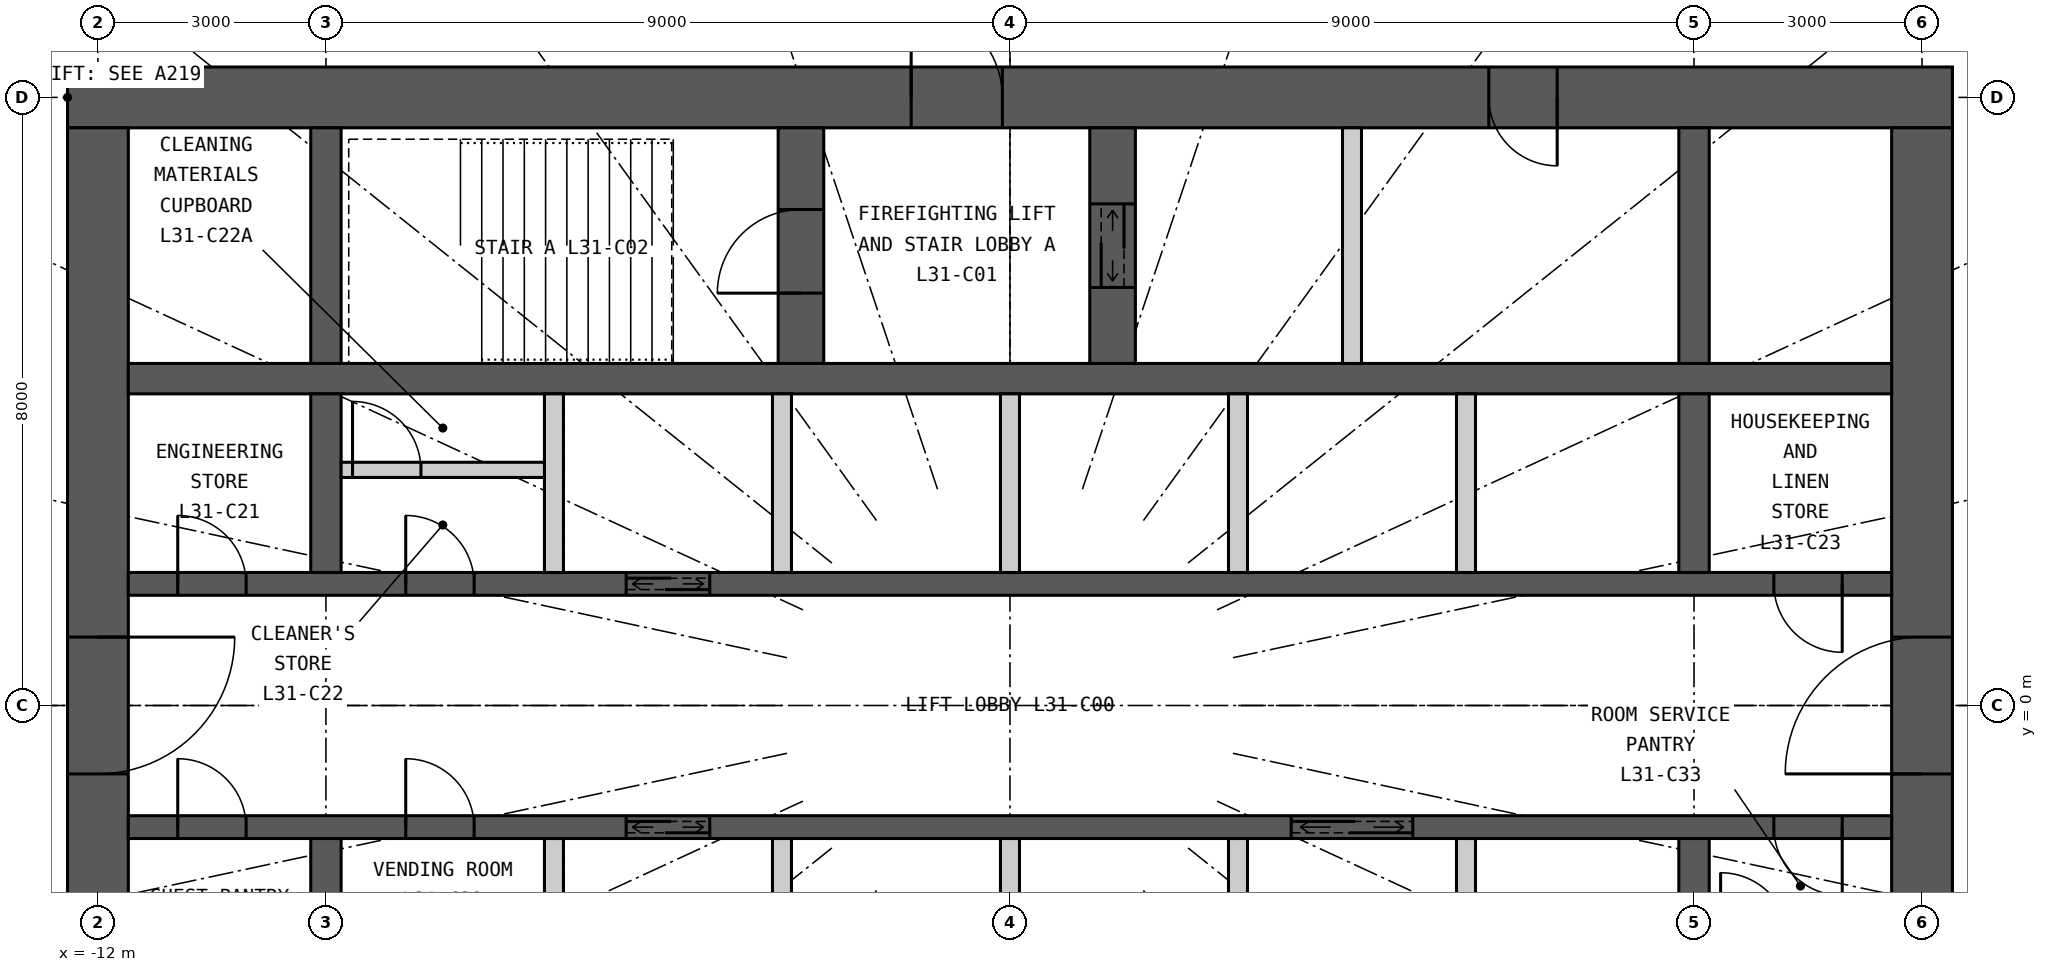
"""IFC4 building model, lengths in metres.
Left out: names, types, materials, properties, quantities, classifications, styles, units other than length and angle.
Written with IfcOpenShell. Run it as: python <this file> out.ifc"""

import sys

from ifc_helpers import new_model, si_unit, direction, frame, frame_2d, origin, place, context, subcontext, project, spatial, rectangle, extrude, element, fill, save


model = new_model("IFC4")
c1 = context("Model", 3, precision=1e-05, world=origin(), true_north=direction((0.0, 1.0)))
c2 = subcontext(c1, "Body", "Model", "MODEL_VIEW")
j1 = project(units=[si_unit("LENGTHUNIT", "METRE"), si_unit("PLANEANGLEUNIT", "RADIAN")], contexts=[c1])
p1 = place(None, origin())
s1 = spatial("IfcSite", under=j1, at=p1, CompositionType="ELEMENT")
p2 = place(p1, origin())
s2 = spatial("IfcBuilding", under=s1, at=p2, CompositionType="ELEMENT")
p3 = place(p2, frame((0.0, 0.0, 122.1)))
s3 = spatial("IfcBuildingStorey", under=s2, at=p3, CompositionType="ELEMENT", Elevation=122.1)
p4 = place(p3, frame((-12.4, 8.0, 0.0), z_axis=(0.0, 0.0, 1.0), x_axis=(1.0, 0.0, 0.0)))
e1 = element("IfcWall", 1, at=p4, inside=s3, PredefinedType="SHEAR", context=c2, shape_type="SweptSolid", body=[
    extrude(rectangle(XDim=24.8, YDim=0.8, at=frame_2d((12.4, 0.0))), origin(), (0.0, 0.0, 1.0), 3.3),
])
p5 = place(p4, frame((11.1, 0.0, 0.0)))
e2 = element("IfcOpeningElement", 2, at=p5, cuts=e1, PredefinedType="OPENING", context=c2, shape_type="SweptSolid", body=[
    extrude(rectangle(XDim=1.2, YDim=2.2, at=frame_2d((0.6, 1.1))), frame((0.0, 0.41, 0.0), z_axis=(0.0, -1.0, 0.0), x_axis=(1.0, 0.0, 0.0)), (0.0, 0.0, 1.0), 0.82),
])
p6 = place(p4, frame((18.7, 0.0, 0.0)))
e3 = element("IfcOpeningElement", 3, at=p6, cuts=e1, PredefinedType="OPENING", context=c2, shape_type="SweptSolid", body=[
    extrude(rectangle(XDim=0.9, YDim=2.2, at=frame_2d((0.45, 1.1))), frame((0.0, 0.41, 0.0), z_axis=(0.0, -1.0, 0.0), x_axis=(1.0, 0.0, 0.0)), (0.0, 0.0, 1.0), 0.82),
])
p7 = place(p3, frame((12.0, -7.6, 0.0), z_axis=(0.0, 0.0, 1.0), x_axis=(0.0, 1.0, 0.0)))
e4 = element("IfcWall", 4, at=p7, inside=s3, PredefinedType="SHEAR", context=c2, shape_type="SweptSolid", body=[
    extrude(rectangle(XDim=15.2, YDim=0.8, at=frame_2d((7.6, 0.0))), origin(), (0.0, 0.0, 1.0), 3.3),
])
p8 = place(p7, frame((6.7, 0.0, 0.0)))
e5 = element("IfcOpeningElement", 5, at=p8, cuts=e4, PredefinedType="OPENING", context=c2, shape_type="SweptSolid", body=[
    extrude(rectangle(XDim=1.8, YDim=2.2, at=frame_2d((0.9, 1.1))), frame((0.0, 0.41, 0.0), z_axis=(0.0, -1.0, 0.0), x_axis=(1.0, 0.0, 0.0)), (0.0, 0.0, 1.0), 0.82),
])
p9 = place(p3, frame((-12.0, 7.6, 0.0), z_axis=(0.0, 0.0, 1.0), x_axis=(0.0, -1.0, 0.0)))
e6 = element("IfcWall", 6, at=p9, inside=s3, PredefinedType="SHEAR", context=c2, shape_type="SweptSolid", body=[
    extrude(rectangle(XDim=15.2, YDim=0.8, at=frame_2d((7.6, 0.0))), origin(), (0.0, 0.0, 1.0), 3.3),
])
p10 = place(p9, frame((6.7, 0.0, 0.0)))
e7 = element("IfcOpeningElement", 7, at=p10, cuts=e6, PredefinedType="OPENING", context=c2, shape_type="SweptSolid", body=[
    extrude(rectangle(XDim=1.8, YDim=2.2, at=frame_2d((0.9, 1.1))), frame((0.0, 0.41, 0.0), z_axis=(0.0, -1.0, 0.0), x_axis=(1.0, 0.0, 0.0)), (0.0, 0.0, 1.0), 0.82),
])
p11 = place(p3, frame((-11.6, 4.3, 0.0), z_axis=(0.0, 0.0, 1.0), x_axis=(1.0, 0.0, 0.0)))
e8 = element("IfcWall", 8, at=p11, inside=s3, PredefinedType="SHEAR", context=c2, shape_type="SweptSolid", body=[
    extrude(rectangle(XDim=23.2, YDim=0.4, at=frame_2d((11.6, 0.0))), origin(), (0.0, 0.0, 1.0), 3.3),
])
p12 = place(p3, frame((-11.6, 1.6, 0.0), z_axis=(0.0, 0.0, 1.0), x_axis=(1.0, 0.0, 0.0)))
e9 = element("IfcWall", 9, at=p12, inside=s3, PredefinedType="SHEAR", context=c2, shape_type="SweptSolid", body=[
    extrude(rectangle(XDim=23.2, YDim=0.3, at=frame_2d((11.6, 0.0))), origin(), (0.0, 0.0, 1.0), 3.3),
])
p13 = place(p12, frame((6.55, 0.0, 0.0)))
e10 = element("IfcOpeningElement", 10, at=p13, cuts=e9, PredefinedType="OPENING", context=c2, shape_type="SweptSolid", body=[
    extrude(rectangle(XDim=1.1, YDim=2.2, at=frame_2d((0.55, 1.1))), frame((0.0, 0.16, 0.0), z_axis=(0.0, -1.0, 0.0), x_axis=(1.0, 0.0, 0.0)), (0.0, 0.0, 1.0), 0.32),
])
p14 = place(p12, frame((0.65, 0.0, 0.0)))
e11 = element("IfcOpeningElement", 11, at=p14, cuts=e9, PredefinedType="OPENING", context=c2, shape_type="SweptSolid", body=[
    extrude(rectangle(XDim=0.9, YDim=2.2, at=frame_2d((0.45, 1.1))), frame((0.0, 0.16, 0.0), z_axis=(0.0, -1.0, 0.0), x_axis=(1.0, 0.0, 0.0)), (0.0, 0.0, 1.0), 0.32),
])
p15 = place(p12, frame((3.65, 0.0, 0.0)))
e12 = element("IfcOpeningElement", 12, at=p15, cuts=e9, PredefinedType="OPENING", context=c2, shape_type="SweptSolid", body=[
    extrude(rectangle(XDim=0.9, YDim=2.2, at=frame_2d((0.45, 1.1))), frame((0.0, 0.16, 0.0), z_axis=(0.0, -1.0, 0.0), x_axis=(1.0, 0.0, 0.0)), (0.0, 0.0, 1.0), 0.32),
])
p16 = place(p12, frame((21.65, 0.0, 0.0)))
e13 = element("IfcOpeningElement", 13, at=p16, cuts=e9, PredefinedType="OPENING", context=c2, shape_type="SweptSolid", body=[
    extrude(rectangle(XDim=0.9, YDim=2.2, at=frame_2d((0.45, 1.1))), frame((0.0, 0.16, 0.0), z_axis=(0.0, -1.0, 0.0), x_axis=(1.0, 0.0, 0.0)), (0.0, 0.0, 1.0), 0.32),
])
p17 = place(p3, frame((-11.6, -1.6, 0.0), z_axis=(0.0, 0.0, 1.0), x_axis=(1.0, 0.0, 0.0)))
e14 = element("IfcWall", 14, at=p17, inside=s3, PredefinedType="SHEAR", context=c2, shape_type="SweptSolid", body=[
    extrude(rectangle(XDim=23.2, YDim=0.3, at=frame_2d((11.6, 0.0))), origin(), (0.0, 0.0, 1.0), 3.3),
])
p18 = place(p17, frame((6.55, 0.0, 0.0)))
e15 = element("IfcOpeningElement", 15, at=p18, cuts=e14, PredefinedType="OPENING", context=c2, shape_type="SweptSolid", body=[
    extrude(rectangle(XDim=1.1, YDim=2.2, at=frame_2d((0.55, 1.1))), frame((0.0, 0.16, 0.0), z_axis=(0.0, -1.0, 0.0), x_axis=(1.0, 0.0, 0.0)), (0.0, 0.0, 1.0), 0.32),
])
p19 = place(p17, frame((15.3, 0.0, 0.0)))
e16 = element("IfcOpeningElement", 16, at=p19, cuts=e14, PredefinedType="OPENING", context=c2, shape_type="SweptSolid", body=[
    extrude(rectangle(XDim=1.6, YDim=2.4, at=frame_2d((0.8, 1.2))), frame((0.0, 0.16, 0.0), z_axis=(0.0, -1.0, 0.0), x_axis=(1.0, 0.0, 0.0)), (0.0, 0.0, 1.0), 0.32),
])
p20 = place(p17, frame((0.65, 0.0, 0.0)))
e17 = element("IfcOpeningElement", 17, at=p20, cuts=e14, PredefinedType="OPENING", context=c2, shape_type="SweptSolid", body=[
    extrude(rectangle(XDim=0.9, YDim=2.2, at=frame_2d((0.45, 1.1))), frame((0.0, 0.16, 0.0), z_axis=(0.0, -1.0, 0.0), x_axis=(1.0, 0.0, 0.0)), (0.0, 0.0, 1.0), 0.32),
])
p21 = place(p17, frame((3.65, 0.0, 0.0)))
e18 = element("IfcOpeningElement", 18, at=p21, cuts=e14, PredefinedType="OPENING", context=c2, shape_type="SweptSolid", body=[
    extrude(rectangle(XDim=0.9, YDim=2.2, at=frame_2d((0.45, 1.1))), frame((0.0, 0.16, 0.0), z_axis=(0.0, -1.0, 0.0), x_axis=(1.0, 0.0, 0.0)), (0.0, 0.0, 1.0), 0.32),
])
p22 = place(p17, frame((21.65, 0.0, 0.0)))
e19 = element("IfcOpeningElement", 19, at=p22, cuts=e14, PredefinedType="OPENING", context=c2, shape_type="SweptSolid", body=[
    extrude(rectangle(XDim=0.9, YDim=2.2, at=frame_2d((0.45, 1.1))), frame((0.0, 0.16, 0.0), z_axis=(0.0, -1.0, 0.0), x_axis=(1.0, 0.0, 0.0)), (0.0, 0.0, 1.0), 0.32),
])
p23 = place(p3, frame((-9.0, 4.5, 0.0), z_axis=(0.0, 0.0, 1.0), x_axis=(0.0, 1.0, 0.0)))
e20 = element("IfcWall", 20, at=p23, inside=s3, PredefinedType="SHEAR", context=c2, shape_type="SweptSolid", body=[
    extrude(rectangle(XDim=3.1, YDim=0.4, at=frame_2d((1.55, 0.0))), origin(), (0.0, 0.0, 1.0), 3.3),
])
for number, where, z_axis, x_axis in (
    (21, (-9.0, 1.75, 0.0), (0.0, 0.0, 1.0), (0.0, 1.0, 0.0)),
    (22, (-9.0, -4.1, 0.0), (0.0, 0.0, 1.0), (0.0, 1.0, 0.0)),
):
    element("IfcWall", number, at=place(p3, frame(where, z_axis=z_axis, x_axis=x_axis)), inside=s3, PredefinedType="SHEAR", context=c2, shape_type="SweptSolid", body=[
        extrude(rectangle(XDim=2.35, YDim=0.4, at=frame_2d((1.175, 0.0))), origin(), (0.0, 0.0, 1.0), 3.3),
    ])
p24 = place(p3, frame((9.0, 4.5, 0.0), z_axis=(0.0, 0.0, 1.0), x_axis=(0.0, 1.0, 0.0)))
e23 = element("IfcWall", 23, at=p24, inside=s3, PredefinedType="SHEAR", context=c2, shape_type="SweptSolid", body=[
    extrude(rectangle(XDim=3.1, YDim=0.4, at=frame_2d((1.55, 0.0))), origin(), (0.0, 0.0, 1.0), 3.3),
])
for number, where, z_axis, x_axis in (
    (24, (9.0, 1.75, 0.0), (0.0, 0.0, 1.0), (0.0, 1.0, 0.0)),
    (25, (9.0, -4.1, 0.0), (0.0, 0.0, 1.0), (0.0, 1.0, 0.0)),
):
    element("IfcWall", number, at=place(p3, frame(where, z_axis=z_axis, x_axis=x_axis)), inside=s3, PredefinedType="SHEAR", context=c2, shape_type="SweptSolid", body=[
        extrude(rectangle(XDim=2.35, YDim=0.4, at=frame_2d((1.175, 0.0))), origin(), (0.0, 0.0, 1.0), 3.3),
    ])
p25 = place(p3, frame((-2.75, 4.5, 0.0), z_axis=(0.0, 0.0, 1.0), x_axis=(0.0, 1.0, 0.0)))
e26 = element("IfcWall", 26, at=p25, inside=s3, PredefinedType="SHEAR", context=c2, shape_type="SweptSolid", body=[
    extrude(rectangle(XDim=3.1, YDim=0.6, at=frame_2d((1.55, 0.0))), origin(), (0.0, 0.0, 1.0), 3.3),
])
p26 = place(p25, frame((0.925, 0.0, 0.0)))
e27 = element("IfcOpeningElement", 27, at=p26, cuts=e26, PredefinedType="OPENING", context=c2, shape_type="SweptSolid", body=[
    extrude(rectangle(XDim=1.1, YDim=2.2, at=frame_2d((0.55, 1.1))), frame((0.0, 0.31, 0.0), z_axis=(0.0, -1.0, 0.0), x_axis=(1.0, 0.0, 0.0)), (0.0, 0.0, 1.0), 0.62),
])
p27 = place(p3, frame((1.35, 4.5, 0.0), z_axis=(0.0, 0.0, 1.0), x_axis=(0.0, 1.0, 0.0)))
e28 = element("IfcWall", 28, at=p27, inside=s3, PredefinedType="SHEAR", context=c2, shape_type="SweptSolid", body=[
    extrude(rectangle(XDim=3.1, YDim=0.6, at=frame_2d((1.55, 0.0))), origin(), (0.0, 0.0, 1.0), 3.3),
])
p28 = place(p27, frame((1.0, 0.0, 0.0)))
e29 = element("IfcOpeningElement", 29, at=p28, cuts=e28, PredefinedType="OPENING", context=c2, shape_type="SweptSolid", body=[
    extrude(rectangle(XDim=1.1, YDim=2.2, at=frame_2d((0.55, 1.1))), frame((0.0, 0.31, 0.0), z_axis=(0.0, -1.0, 0.0), x_axis=(1.0, 0.0, 0.0)), (0.0, 0.0, 1.0), 0.62),
])
p29 = place(p3, frame((4.5, 4.5, 0.0), z_axis=(0.0, 0.0, 1.0), x_axis=(0.0, 1.0, 0.0)))
e30 = element("IfcWall", 30, at=p29, inside=s3, PredefinedType="PARTITIONING", context=c2, shape_type="SweptSolid", body=[
    extrude(rectangle(XDim=3.1, YDim=0.25, at=frame_2d((1.55, 0.0))), origin(), (0.0, 0.0, 1.0), 3.3),
])
for number, where, z_axis, x_axis in (
    (31, (-6.0, 1.75, 0.0), (0.0, 0.0, 1.0), (0.0, 1.0, 0.0)),
    (32, (-3.0, 1.75, 0.0), (0.0, 0.0, 1.0), (0.0, 1.0, 0.0)),
    (33, (0.0, 1.75, 0.0), (0.0, 0.0, 1.0), (0.0, 1.0, 0.0)),
    (34, (3.0, 1.75, 0.0), (0.0, 0.0, 1.0), (0.0, 1.0, 0.0)),
    (35, (6.0, 1.75, 0.0), (0.0, 0.0, 1.0), (0.0, 1.0, 0.0)),
    (36, (-6.0, -4.1, 0.0), (0.0, 0.0, 1.0), (0.0, 1.0, 0.0)),
    (37, (-3.0, -4.1, 0.0), (0.0, 0.0, 1.0), (0.0, 1.0, 0.0)),
    (38, (0.0, -4.1, 0.0), (0.0, 0.0, 1.0), (0.0, 1.0, 0.0)),
    (39, (3.0, -4.1, 0.0), (0.0, 0.0, 1.0), (0.0, 1.0, 0.0)),
    (40, (6.0, -4.1, 0.0), (0.0, 0.0, 1.0), (0.0, 1.0, 0.0)),
):
    element("IfcWall", number, at=place(p3, frame(where, z_axis=z_axis, x_axis=x_axis)), inside=s3, PredefinedType="PARTITIONING", context=c2, shape_type="SweptSolid", body=[
        extrude(rectangle(XDim=2.35, YDim=0.25, at=frame_2d((1.175, 0.0))), origin(), (0.0, 0.0, 1.0), 3.3),
    ])
p30 = place(p3, frame((-8.8, 3.1, 0.0), z_axis=(0.0, 0.0, 1.0), x_axis=(1.0, 0.0, 0.0)))
e41 = element("IfcWall", 41, at=p30, inside=s3, PredefinedType="PARTITIONING", context=c2, shape_type="SweptSolid", body=[
    extrude(rectangle(XDim=2.675, YDim=0.2, at=frame_2d((1.337, 0.0))), origin(), (0.0, 0.0, 1.0), 3.12),
])
p31 = place(p30, frame((0.15, 0.0, 0.0)))
e42 = element("IfcOpeningElement", 42, at=p31, cuts=e41, PredefinedType="OPENING", context=c2, shape_type="SweptSolid", body=[
    extrude(rectangle(XDim=0.9, YDim=2.2, at=frame_2d((0.45, 1.1))), frame((0.0, 0.11, 0.0), z_axis=(0.0, -1.0, 0.0), x_axis=(1.0, 0.0, 0.0)), (0.0, 0.0, 1.0), 0.22),
])
p32 = place(p5, origin())
e43 = element("IfcDoor", 43, at=p32, inside=s3, OperationType="SINGLE_SWING_LEFT", PredefinedType="DOOR", context=c2, shape_type="SweptSolid", body=[
    extrude(rectangle(XDim=1.2, YDim=2.2, at=frame_2d((0.6, 1.1))), frame((0.0, 0.025, 0.0), z_axis=(0.0, -1.0, 0.0), x_axis=(1.0, 0.0, 0.0)), (0.0, 0.0, 1.0), 0.05),
])
fill(e2, e43)
p33 = place(p26, origin())
e44 = element("IfcDoor", 44, at=p33, inside=s3, OperationType="SINGLE_SWING_LEFT", PredefinedType="DOOR", context=c2, shape_type="SweptSolid", body=[
    extrude(rectangle(XDim=1.1, YDim=2.2, at=frame_2d((0.55, 1.1))), frame((0.0, 0.025, 0.0), z_axis=(0.0, -1.0, 0.0), x_axis=(1.0, 0.0, 0.0)), (0.0, 0.0, 1.0), 0.05),
])
fill(e27, e44)
p34 = place(p28, origin())
e45 = element("IfcDoor", 45, at=p34, inside=s3, OperationType="DOUBLE_DOOR_SLIDING", PredefinedType="DOOR", context=c2, shape_type="SweptSolid", body=[
    extrude(rectangle(XDim=1.1, YDim=2.2, at=frame_2d((0.55, 1.1))), frame((0.0, 0.025, 0.0), z_axis=(0.0, -1.0, 0.0), x_axis=(1.0, 0.0, 0.0)), (0.0, 0.0, 1.0), 0.05),
])
fill(e29, e45)
p35 = place(p6, origin())
e46 = element("IfcDoor", 46, at=p35, inside=s3, OperationType="SINGLE_SWING_RIGHT", PredefinedType="DOOR", context=c2, shape_type="SweptSolid", body=[
    extrude(rectangle(XDim=0.9, YDim=2.2, at=frame_2d((0.45, 1.1))), frame((0.0, 0.025, 0.0), z_axis=(0.0, -1.0, 0.0), x_axis=(1.0, 0.0, 0.0)), (0.0, 0.0, 1.0), 0.05),
])
fill(e3, e46)
p36 = place(p13, origin())
e47 = element("IfcDoor", 47, at=p36, inside=s3, OperationType="DOUBLE_DOOR_SLIDING", PredefinedType="DOOR", context=c2, shape_type="SweptSolid", body=[
    extrude(rectangle(XDim=1.1, YDim=2.2, at=frame_2d((0.55, 1.1))), frame((0.0, 0.025, 0.0), z_axis=(0.0, -1.0, 0.0), x_axis=(1.0, 0.0, 0.0)), (0.0, 0.0, 1.0), 0.05),
])
fill(e10, e47)
p37 = place(p18, origin())
e48 = element("IfcDoor", 48, at=p37, inside=s3, OperationType="DOUBLE_DOOR_SLIDING", PredefinedType="DOOR", context=c2, shape_type="SweptSolid", body=[
    extrude(rectangle(XDim=1.1, YDim=2.2, at=frame_2d((0.55, 1.1))), frame((0.0, 0.025, 0.0), z_axis=(0.0, -1.0, 0.0), x_axis=(1.0, 0.0, 0.0)), (0.0, 0.0, 1.0), 0.05),
])
fill(e15, e48)
p38 = place(p19, origin())
e49 = element("IfcDoor", 49, at=p38, inside=s3, OperationType="DOUBLE_DOOR_SLIDING", PredefinedType="DOOR", context=c2, shape_type="SweptSolid", body=[
    extrude(rectangle(XDim=1.6, YDim=2.4, at=frame_2d((0.8, 1.2))), frame((0.0, 0.025, 0.0), z_axis=(0.0, -1.0, 0.0), x_axis=(1.0, 0.0, 0.0)), (0.0, 0.0, 1.0), 0.05),
])
fill(e16, e49)
p39 = place(p14, origin())
e50 = element("IfcDoor", 50, at=p39, inside=s3, OperationType="SINGLE_SWING_LEFT", PredefinedType="DOOR", context=c2, shape_type="SweptSolid", body=[
    extrude(rectangle(XDim=0.9, YDim=2.2, at=frame_2d((0.45, 1.1))), frame((0.0, 0.025, 0.0), z_axis=(0.0, -1.0, 0.0), x_axis=(1.0, 0.0, 0.0)), (0.0, 0.0, 1.0), 0.05),
])
fill(e11, e50)
p40 = place(p31, origin())
e51 = element("IfcDoor", 51, at=p40, inside=s3, OperationType="SINGLE_SWING_LEFT", PredefinedType="DOOR", context=c2, shape_type="SweptSolid", body=[
    extrude(rectangle(XDim=0.9, YDim=2.2, at=frame_2d((0.45, 1.1))), frame((0.0, 0.025, 0.0), z_axis=(0.0, -1.0, 0.0), x_axis=(1.0, 0.0, 0.0)), (0.0, 0.0, 1.0), 0.05),
])
fill(e42, e51)
p41 = place(p15, origin())
e52 = element("IfcDoor", 52, at=p41, inside=s3, OperationType="SINGLE_SWING_LEFT", PredefinedType="DOOR", context=c2, shape_type="SweptSolid", body=[
    extrude(rectangle(XDim=0.9, YDim=2.2, at=frame_2d((0.45, 1.1))), frame((0.0, 0.025, 0.0), z_axis=(0.0, -1.0, 0.0), x_axis=(1.0, 0.0, 0.0)), (0.0, 0.0, 1.0), 0.05),
])
fill(e12, e52)
p42 = place(p16, origin())
e53 = element("IfcDoor", 53, at=p42, inside=s3, OperationType="SINGLE_SWING_RIGHT", PredefinedType="DOOR", context=c2, shape_type="SweptSolid", body=[
    extrude(rectangle(XDim=0.9, YDim=2.2, at=frame_2d((0.45, 1.1))), frame((0.0, 0.025, 0.0), z_axis=(0.0, -1.0, 0.0), x_axis=(1.0, 0.0, 0.0)), (0.0, 0.0, 1.0), 0.05),
])
fill(e13, e53)
p43 = place(p20, origin())
e54 = element("IfcDoor", 54, at=p43, inside=s3, OperationType="SINGLE_SWING_LEFT", PredefinedType="DOOR", context=c2, shape_type="SweptSolid", body=[
    extrude(rectangle(XDim=0.9, YDim=2.2, at=frame_2d((0.45, 1.1))), frame((0.0, 0.025, 0.0), z_axis=(0.0, -1.0, 0.0), x_axis=(1.0, 0.0, 0.0)), (0.0, 0.0, 1.0), 0.05),
])
fill(e17, e54)
p44 = place(p21, origin())
e55 = element("IfcDoor", 55, at=p44, inside=s3, OperationType="SINGLE_SWING_LEFT", PredefinedType="DOOR", context=c2, shape_type="SweptSolid", body=[
    extrude(rectangle(XDim=0.9, YDim=2.2, at=frame_2d((0.45, 1.1))), frame((0.0, 0.025, 0.0), z_axis=(0.0, -1.0, 0.0), x_axis=(1.0, 0.0, 0.0)), (0.0, 0.0, 1.0), 0.05),
])
fill(e18, e55)
p45 = place(p22, origin())
e56 = element("IfcDoor", 56, at=p45, inside=s3, OperationType="SINGLE_SWING_RIGHT", PredefinedType="DOOR", context=c2, shape_type="SweptSolid", body=[
    extrude(rectangle(XDim=0.9, YDim=2.2, at=frame_2d((0.45, 1.1))), frame((0.0, 0.025, 0.0), z_axis=(0.0, -1.0, 0.0), x_axis=(1.0, 0.0, 0.0)), (0.0, 0.0, 1.0), 0.05),
])
fill(e19, e56)
p46 = place(p8, origin())
e57 = element("IfcDoor", 57, at=p46, inside=s3, OperationType="DOUBLE_DOOR_DOUBLE_SWING", PredefinedType="DOOR", context=c2, shape_type="SweptSolid", body=[
    extrude(rectangle(XDim=1.8, YDim=2.2, at=frame_2d((0.9, 1.1))), frame((0.0, 0.025, 0.0), z_axis=(0.0, -1.0, 0.0), x_axis=(1.0, 0.0, 0.0)), (0.0, 0.0, 1.0), 0.05),
])
fill(e5, e57)
p47 = place(p10, origin())
e58 = element("IfcDoor", 58, at=p47, inside=s3, OperationType="DOUBLE_DOOR_DOUBLE_SWING", PredefinedType="DOOR", context=c2, shape_type="SweptSolid", body=[
    extrude(rectangle(XDim=1.8, YDim=2.2, at=frame_2d((0.9, 1.1))), frame((0.0, 0.025, 0.0), z_axis=(0.0, -1.0, 0.0), x_axis=(1.0, 0.0, 0.0)), (0.0, 0.0, 1.0), 0.05),
])
fill(e7, e58)
save(model, sys.argv[1])
